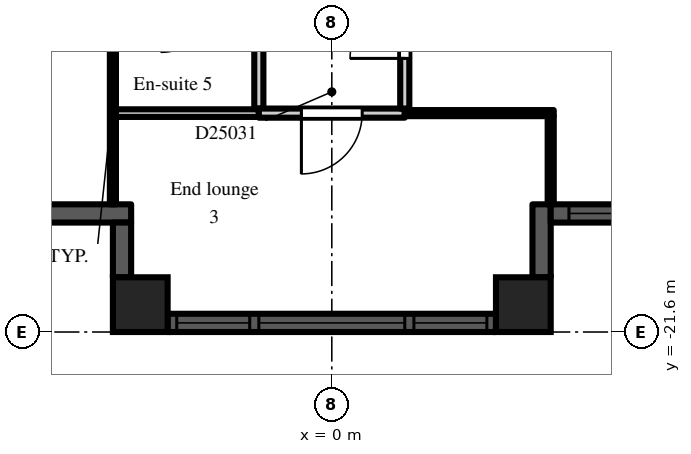
"""IFC4 building model, lengths in metres.
Left out: names, types, materials, properties, quantities, classifications, styles, units other than length and angle.
Written with IfcOpenShell. Run it as: python <this file> out.ifc"""

import sys

from ifc_helpers import new_model, si_unit, direction, frame, frame_2d, origin, origin_2d, place, context, subcontext, project, spatial, rectangle, extrude, element, fill, save


model = new_model("IFC4")
c1 = context("Model", 3, precision=1e-05, world=origin(), true_north=direction((0.0, 1.0)))
c2 = subcontext(c1, "Body", "Model", "MODEL_VIEW")
j1 = project(units=[si_unit("LENGTHUNIT", "METRE"), si_unit("PLANEANGLEUNIT", "RADIAN")], contexts=[c1])
p1 = place(None, origin())
s1 = spatial("IfcSite", under=j1, at=p1, CompositionType="ELEMENT")
p2 = place(p1, origin())
s2 = spatial("IfcBuilding", under=s1, at=p2, CompositionType="ELEMENT")
p3 = place(p2, frame((0.0, 0.0, 170.7)))
s3 = spatial("IfcBuildingStorey", under=s2, at=p3, CompositionType="ELEMENT", Elevation=170.7)
for number, where, z_axis, x_axis in (
    (1, (-3.15, -21.15, 0.0), (0.0, 0.0, 1.0), (1.0, 0.0, 0.0)),
    (2, (3.15, -21.15, 0.0), (0.0, 0.0, 1.0), (1.0, 0.0, 0.0)),
):
    element("IfcColumn", number, at=place(p3, frame(where, z_axis=z_axis, x_axis=x_axis)), inside=s3, PredefinedType="COLUMN", context=c2, shape_type="SweptSolid", body=[
        extrude(rectangle(XDim=0.9, YDim=0.9, at=origin_2d()), origin(), (0.0, 0.0, 1.0), 3.0),
    ])
p4 = place(p3, frame((-5.1, -19.65, 0.0), z_axis=(0.0, 0.0, 1.0), x_axis=(1.0, 0.0, 0.0)))
e3 = element("IfcWall", 3, at=p4, inside=s3, PredefinedType="SOLIDWALL", context=c2, shape_type="SweptSolid", body=[
    extrude(rectangle(XDim=1.8, YDim=0.3, at=frame_2d((0.9, 0.0))), origin(), (0.0, 0.0, 1.0), 2.6),
])
p5 = place(p3, frame((-3.45, -19.8, 0.0), z_axis=(0.0, 0.0, 1.0), x_axis=(0.0, -1.0, 0.0)))
e4 = element("IfcWall", 4, at=p5, inside=s3, PredefinedType="SOLIDWALL", context=c2, shape_type="SweptSolid", body=[
    extrude(rectangle(XDim=0.9, YDim=0.3, at=frame_2d((0.45, 0.0))), origin(), (0.0, 0.0, 1.0), 2.6),
])
p6 = place(p3, frame((-2.7, -21.45, 0.0), z_axis=(0.0, 0.0, 1.0), x_axis=(1.0, 0.0, 0.0)))
e5 = element("IfcWall", 5, at=p6, inside=s3, PredefinedType="SOLIDWALL", context=c2, shape_type="SweptSolid", body=[
    extrude(rectangle(XDim=5.4, YDim=0.3, at=frame_2d((2.7, 0.0))), origin(), (0.0, 0.0, 1.0), 2.2),
])
p7 = place(p6, frame((1.5, 0.0, 0.2)))
e6 = element("IfcOpeningElement", 6, at=p7, cuts=e5, PredefinedType="OPENING", context=c2, shape_type="SweptSolid", body=[
    extrude(rectangle(XDim=2.4, YDim=1.85, at=frame_2d((1.2, 0.925))), frame((0.0, 0.16, 0.0), z_axis=(0.0, -1.0, 0.0), x_axis=(1.0, 0.0, 0.0)), (0.0, 0.0, 1.0), 0.32),
])
p8 = place(p6, frame((0.15, 0.0, 0.2)))
e7 = element("IfcOpeningElement", 7, at=p8, cuts=e5, PredefinedType="OPENING", context=c2, shape_type="SweptSolid", body=[
    extrude(rectangle(XDim=1.2, YDim=1.85, at=frame_2d((0.6, 0.925))), frame((0.0, 0.16, 0.0), z_axis=(0.0, -1.0, 0.0), x_axis=(1.0, 0.0, 0.0)), (0.0, 0.0, 1.0), 0.32),
])
p9 = place(p6, frame((4.05, 0.0, 0.2)))
e8 = element("IfcOpeningElement", 8, at=p9, cuts=e5, PredefinedType="OPENING", context=c2, shape_type="SweptSolid", body=[
    extrude(rectangle(XDim=1.2, YDim=1.85, at=frame_2d((0.6, 0.925))), frame((0.0, 0.16, 0.0), z_axis=(0.0, -1.0, 0.0), x_axis=(1.0, 0.0, 0.0)), (0.0, 0.0, 1.0), 0.32),
])
p10 = place(p3, frame((3.45, -20.7, 0.0), z_axis=(0.0, 0.0, 1.0), x_axis=(0.0, 1.0, 0.0)))
e9 = element("IfcWall", 9, at=p10, inside=s3, PredefinedType="SOLIDWALL", context=c2, shape_type="SweptSolid", body=[
    extrude(rectangle(XDim=1.2, YDim=0.3, at=frame_2d((0.6, 0.0))), origin(), (0.0, 0.0, 1.0), 2.6),
])
p11 = place(p3, frame((3.6, -19.65, 0.0), z_axis=(0.0, 0.0, 1.0), x_axis=(1.0, 0.0, 0.0)))
e10 = element("IfcWall", 10, at=p11, inside=s3, PredefinedType="SOLIDWALL", context=c2, shape_type="SweptSolid", body=[
    extrude(rectangle(XDim=1.8, YDim=0.3, at=frame_2d((0.9, 0.0))), origin(), (0.0, 0.0, 1.0), 2.6),
])
p12 = place(p11, frame((0.3, 0.0, 0.2)))
e11 = element("IfcOpeningElement", 11, at=p12, cuts=e10, PredefinedType="OPENING", context=c2, shape_type="SweptSolid", body=[
    extrude(rectangle(XDim=1.2, YDim=1.85, at=frame_2d((0.6, 0.925))), frame((0.0, 0.16, 0.0), z_axis=(0.0, -1.0, 0.0), x_axis=(1.0, 0.0, 0.0)), (0.0, 0.0, 1.0), 0.32),
])
p13 = place(p3, frame((-3.6, -19.5, 0.0), z_axis=(0.0, 0.0, 1.0), x_axis=(0.0, 1.0, 0.0)))
e12 = element("IfcWall", 12, at=p13, inside=s3, PredefinedType="PARTITIONING", context=c2, shape_type="SweptSolid", body=[
    extrude(rectangle(XDim=3.35, YDim=0.1, at=frame_2d((1.675, 0.0))), origin(), (0.0, 0.0, 1.0), 2.6),
])
p14 = place(p3, frame((-3.55, -18.0, 0.0), z_axis=(0.0, 0.0, 1.0), x_axis=(1.0, 0.0, 0.0)))
e13 = element("IfcWall", 13, at=p14, inside=s3, PredefinedType="PARTITIONING", context=c2, shape_type="SweptSolid", body=[
    extrude(rectangle(XDim=2.35, YDim=0.125, at=frame_2d((1.175, 0.0))), origin(), (0.0, 0.0, 1.0), 2.6),
])
p15 = place(p3, frame((-1.2, -17.925, 0.0), z_axis=(0.0, 0.0, 1.0), x_axis=(0.0, 1.0, 0.0)))
e14 = element("IfcWall", 14, at=p15, inside=s3, PredefinedType="PARTITIONING", context=c2, shape_type="SweptSolid", body=[
    extrude(rectangle(XDim=16.65, YDim=0.15, at=frame_2d((8.325, 0.0))), origin(), (0.0, 0.0, 1.0), 2.6),
])
p16 = place(p15, frame((15.075, 0.0, 0.0)))
e15 = element("IfcOpeningElement", 15, at=p16, cuts=e14, PredefinedType="OPENING", context=c2, shape_type="SweptSolid", body=[
    extrude(rectangle(XDim=0.9, YDim=2.1, at=frame_2d((0.45, 1.05))), frame((0.0, 0.085, 0.0), z_axis=(0.0, -1.0, 0.0), x_axis=(1.0, 0.0, 0.0)), (0.0, 0.0, 1.0), 0.17),
])
p17 = place(p15, frame((12.075, 0.0, 0.0)))
e16 = element("IfcOpeningElement", 16, at=p17, cuts=e14, PredefinedType="OPENING", context=c2, shape_type="SweptSolid", body=[
    extrude(rectangle(XDim=0.9, YDim=2.1, at=frame_2d((0.45, 1.05))), frame((0.0, 0.085, 0.0), z_axis=(0.0, -1.0, 0.0), x_axis=(1.0, 0.0, 0.0)), (0.0, 0.0, 1.0), 0.17),
])
p18 = place(p15, frame((8.875, 0.0, 0.0)))
e17 = element("IfcOpeningElement", 17, at=p18, cuts=e14, PredefinedType="OPENING", context=c2, shape_type="SweptSolid", body=[
    extrude(rectangle(XDim=0.9, YDim=2.1, at=frame_2d((0.45, 1.05))), frame((0.0, 0.085, 0.0), z_axis=(0.0, -1.0, 0.0), x_axis=(1.0, 0.0, 0.0)), (0.0, 0.0, 1.0), 0.17),
])
p19 = place(p15, frame((5.275, 0.0, 0.0)))
e18 = element("IfcOpeningElement", 18, at=p19, cuts=e14, PredefinedType="OPENING", context=c2, shape_type="SweptSolid", body=[
    extrude(rectangle(XDim=0.9, YDim=2.1, at=frame_2d((0.45, 1.05))), frame((0.0, 0.085, 0.0), z_axis=(0.0, -1.0, 0.0), x_axis=(1.0, 0.0, 0.0)), (0.0, 0.0, 1.0), 0.17),
])
p20 = place(p15, frame((2.325, 0.0, 0.0)))
e19 = element("IfcOpeningElement", 19, at=p20, cuts=e14, PredefinedType="OPENING", context=c2, shape_type="SweptSolid", body=[
    extrude(rectangle(XDim=1.0, YDim=2.1, at=frame_2d((0.5, 1.05))), frame((0.0, 0.085, 0.0), z_axis=(0.0, -1.0, 0.0), x_axis=(1.0, 0.0, 0.0)), (0.0, 0.0, 1.0), 0.17),
])
p21 = place(p3, frame((-1.2, -18.0, 0.0), z_axis=(0.0, 0.0, 1.0), x_axis=(1.0, 0.0, 0.0)))
e20 = element("IfcWall", 20, at=p21, inside=s3, PredefinedType="PARTITIONING", context=c2, shape_type="SweptSolid", body=[
    extrude(rectangle(XDim=2.4, YDim=0.15, at=frame_2d((1.2, 0.0))), origin(), (0.0, 0.0, 1.0), 2.6),
])
p22 = place(p21, frame((0.7, 0.0, 0.0)))
e21 = element("IfcOpeningElement", 21, at=p22, cuts=e20, PredefinedType="OPENING", context=c2, shape_type="SweptSolid", body=[
    extrude(rectangle(XDim=1.0, YDim=2.1, at=frame_2d((0.5, 1.05))), frame((0.0, 0.085, 0.0), z_axis=(0.0, -1.0, 0.0), x_axis=(1.0, 0.0, 0.0)), (0.0, 0.0, 1.0), 0.17),
])
p23 = place(p3, frame((1.2, -17.925, 0.0), z_axis=(0.0, 0.0, 1.0), x_axis=(0.0, 1.0, 0.0)))
e22 = element("IfcWall", 22, at=p23, inside=s3, PredefinedType="PARTITIONING", context=c2, shape_type="SweptSolid", body=[
    extrude(rectangle(XDim=16.8, YDim=0.15, at=frame_2d((8.4, 0.0))), origin(), (0.0, 0.0, 1.0), 2.6),
])
p24 = place(p23, frame((11.775, 0.0, 0.0)))
e23 = element("IfcOpeningElement", 23, at=p24, cuts=e22, PredefinedType="OPENING", context=c2, shape_type="SweptSolid", body=[
    extrude(rectangle(XDim=0.9, YDim=2.1, at=frame_2d((0.45, 1.05))), frame((0.0, 0.085, 0.0), z_axis=(0.0, -1.0, 0.0), x_axis=(1.0, 0.0, 0.0)), (0.0, 0.0, 1.0), 0.17),
])
p25 = place(p23, frame((4.475, 0.0, 0.0)))
e24 = element("IfcOpeningElement", 24, at=p25, cuts=e22, PredefinedType="OPENING", context=c2, shape_type="SweptSolid", body=[
    extrude(rectangle(XDim=0.9, YDim=2.1, at=frame_2d((0.45, 1.05))), frame((0.0, 0.085, 0.0), z_axis=(0.0, -1.0, 0.0), x_axis=(1.0, 0.0, 0.0)), (0.0, 0.0, 1.0), 0.17),
])
p26 = place(p23, frame((8.075, 0.0, 0.0)))
e25 = element("IfcOpeningElement", 25, at=p26, cuts=e22, PredefinedType="OPENING", context=c2, shape_type="SweptSolid", body=[
    extrude(rectangle(XDim=0.9, YDim=2.1, at=frame_2d((0.45, 1.05))), frame((0.0, 0.085, 0.0), z_axis=(0.0, -1.0, 0.0), x_axis=(1.0, 0.0, 0.0)), (0.0, 0.0, 1.0), 0.17),
])
p27 = place(p23, frame((0.825, 0.0, 0.0)))
e26 = element("IfcOpeningElement", 26, at=p27, cuts=e22, PredefinedType="OPENING", context=c2, shape_type="SweptSolid", body=[
    extrude(rectangle(XDim=1.8, YDim=2.1, at=frame_2d((0.9, 1.05))), frame((0.0, 0.085, 0.0), z_axis=(0.0, -1.0, 0.0), x_axis=(1.0, 0.0, 0.0)), (0.0, 0.0, 1.0), 0.17),
])
p28 = place(p3, frame((1.2, -18.0, 0.0), z_axis=(0.0, 0.0, 1.0), x_axis=(1.0, 0.0, 0.0)))
e27 = element("IfcWall", 27, at=p28, inside=s3, PredefinedType="PARTITIONING", context=c2, shape_type="SweptSolid", body=[
    extrude(rectangle(XDim=2.45, YDim=0.1, at=frame_2d((1.225, 0.0))), origin(), (0.0, 0.0, 1.0), 2.6),
])
p29 = place(p3, frame((3.6, -19.5, 0.0), z_axis=(0.0, 0.0, 1.0), x_axis=(0.0, 1.0, 0.0)))
e28 = element("IfcWall", 28, at=p29, inside=s3, PredefinedType="PARTITIONING", context=c2, shape_type="SweptSolid", body=[
    extrude(rectangle(XDim=1.45, YDim=0.1, at=frame_2d((0.725, 0.0))), origin(), (0.0, 0.0, 1.0), 2.6),
])
p30 = place(p7, origin())
e29 = element("IfcWindow", 29, at=p30, inside=s3, PartitioningType="SINGLE_PANEL", PredefinedType="WINDOW", context=c2, shape_type="SweptSolid", body=[
    extrude(rectangle(XDim=2.4, YDim=1.85, at=frame_2d((1.2, 0.925))), frame((0.0, 0.03, 0.0), z_axis=(0.0, -1.0, 0.0), x_axis=(1.0, 0.0, 0.0)), (0.0, 0.0, 1.0), 0.06),
])
fill(e6, e29)
p31 = place(p8, origin())
e30 = element("IfcWindow", 30, at=p31, inside=s3, PartitioningType="SINGLE_PANEL", PredefinedType="WINDOW", context=c2, shape_type="SweptSolid", body=[
    extrude(rectangle(XDim=1.2, YDim=1.85, at=frame_2d((0.6, 0.925))), frame((0.0, 0.03, 0.0), z_axis=(0.0, -1.0, 0.0), x_axis=(1.0, 0.0, 0.0)), (0.0, 0.0, 1.0), 0.06),
])
fill(e7, e30)
p32 = place(p9, origin())
e31 = element("IfcWindow", 31, at=p32, inside=s3, PartitioningType="SINGLE_PANEL", PredefinedType="WINDOW", context=c2, shape_type="SweptSolid", body=[
    extrude(rectangle(XDim=1.2, YDim=1.85, at=frame_2d((0.6, 0.925))), frame((0.0, 0.03, 0.0), z_axis=(0.0, -1.0, 0.0), x_axis=(1.0, 0.0, 0.0)), (0.0, 0.0, 1.0), 0.06),
])
fill(e8, e31)
p33 = place(p12, origin())
e32 = element("IfcWindow", 32, at=p33, inside=s3, PartitioningType="SINGLE_PANEL", PredefinedType="WINDOW", context=c2, shape_type="SweptSolid", body=[
    extrude(rectangle(XDim=1.2, YDim=1.85, at=frame_2d((0.6, 0.925))), frame((0.0, 0.03, 0.0), z_axis=(0.0, -1.0, 0.0), x_axis=(1.0, 0.0, 0.0)), (0.0, 0.0, 1.0), 0.06),
])
fill(e11, e32)
p34 = place(p22, frame((1.0, 0.0, 0.0), z_axis=(0.0, 0.0, 1.0), x_axis=(-1.0, 0.0, 0.0)))
e33 = element("IfcDoor", 33, at=p34, inside=s3, OperationType="SINGLE_SWING_RIGHT", PredefinedType="DOOR", context=c2, shape_type="SweptSolid", body=[
    extrude(rectangle(XDim=1.0, YDim=2.1, at=frame_2d((0.5, 1.05))), frame((0.0, 0.025, 0.0), z_axis=(0.0, -1.0, 0.0), x_axis=(1.0, 0.0, 0.0)), (0.0, 0.0, 1.0), 0.05),
])
fill(e21, e33)
p35 = place(p27, origin())
e34 = element("IfcDoor", 34, at=p35, inside=s3, OperationType="DOUBLE_DOOR_DOUBLE_SWING", PredefinedType="DOOR", context=c2, shape_type="SweptSolid", body=[
    extrude(rectangle(XDim=1.8, YDim=2.1, at=frame_2d((0.9, 1.05))), frame((0.0, 0.025, 0.0), z_axis=(0.0, -1.0, 0.0), x_axis=(1.0, 0.0, 0.0)), (0.0, 0.0, 1.0), 0.05),
])
fill(e26, e34)
save(model, sys.argv[1])
